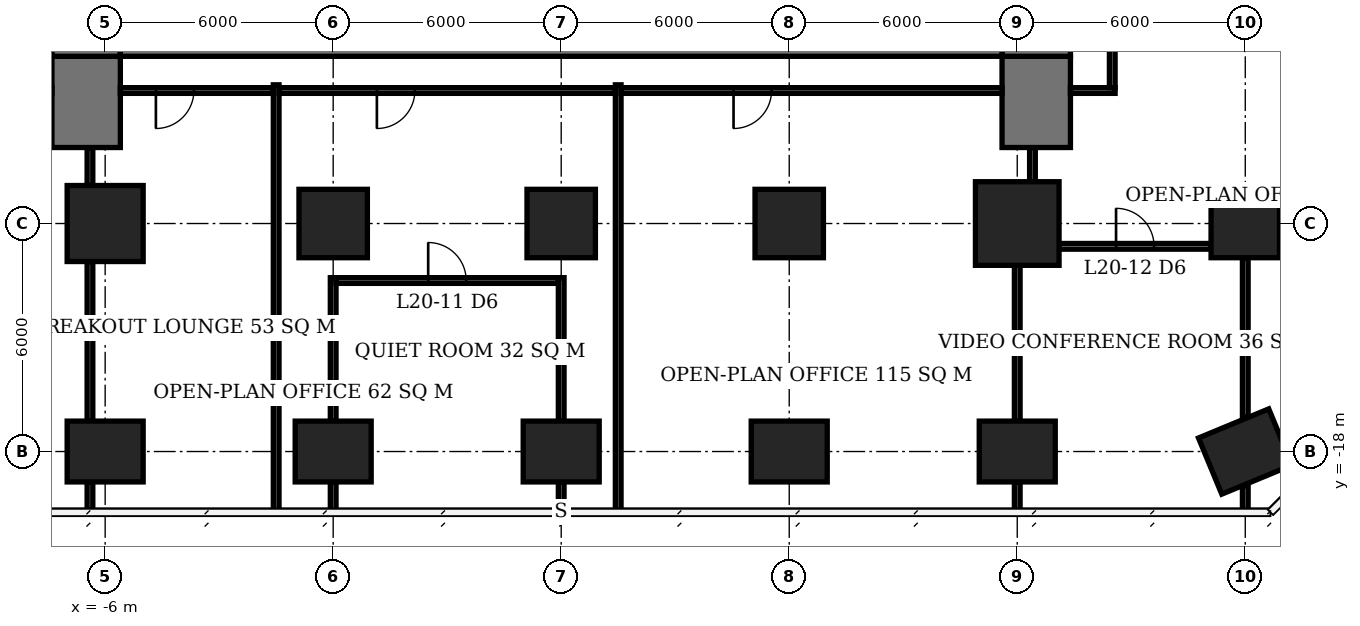
"""IFC4 building model, lengths in metres.
Left out: names, types, materials, properties, quantities, classifications, styles, units other than length and angle.
Written with IfcOpenShell. Run it as: python <this file> out.ifc"""

import sys

from ifc_helpers import new_model, si_unit, direction, frame, frame_2d, origin, origin_2d, place, context, subcontext, project, spatial, rectangle, extrude, element, fill, save


model = new_model("IFC4")
c1 = context("Model", 3, precision=1e-05, world=origin(), true_north=direction((0.0, 1.0)))
c2 = subcontext(c1, "Body", "Model", "MODEL_VIEW")
j1 = project(units=[si_unit("LENGTHUNIT", "METRE"), si_unit("PLANEANGLEUNIT", "RADIAN")], contexts=[c1])
p1 = place(None, origin())
s1 = spatial("IfcSite", under=j1, at=p1, CompositionType="ELEMENT")
p2 = place(p1, origin())
s2 = spatial("IfcBuilding", under=s1, at=p2, CompositionType="ELEMENT")
p3 = place(p2, frame((0.0, 0.0, 84.5)))
s3 = spatial("IfcBuildingStorey", under=s2, at=p3, CompositionType="ELEMENT", Elevation=84.5)
p4 = place(p3, frame((-6.0, -18.0, 0.0), z_axis=(0.0, 0.0, 1.0), x_axis=(1.0, 0.0, 0.0)))
e1 = element("IfcColumn", 1, at=p4, inside=s3, PredefinedType="COLUMN", context=c2, shape_type="SweptSolid", body=[
    extrude(rectangle(XDim=2.0, YDim=1.6, at=origin_2d()), origin(), (0.0, 0.0, 1.0), 3.9),
])
p5 = place(p3, frame((-6.0, -12.0, 0.0), z_axis=(0.0, 0.0, 1.0), x_axis=(1.0, 0.0, 0.0)))
e2 = element("IfcColumn", 2, at=p5, inside=s3, PredefinedType="COLUMN", context=c2, shape_type="SweptSolid", body=[
    extrude(rectangle(XDim=2.0, YDim=2.0, at=origin_2d()), origin(), (0.0, 0.0, 1.0), 3.9),
])
p6 = place(p3, frame((0.0, -18.0, 0.0), z_axis=(0.0, 0.0, 1.0), x_axis=(1.0, 0.0, 0.0)))
e3 = element("IfcColumn", 3, at=p6, inside=s3, PredefinedType="COLUMN", context=c2, shape_type="SweptSolid", body=[
    extrude(rectangle(XDim=2.0, YDim=1.6, at=origin_2d()), origin(), (0.0, 0.0, 1.0), 3.9),
])
p7 = place(p3, frame((0.0, -12.0, 0.0), z_axis=(0.0, 0.0, 1.0), x_axis=(1.0, 0.0, 0.0)))
e4 = element("IfcColumn", 4, at=p7, inside=s3, PredefinedType="COLUMN", context=c2, shape_type="SweptSolid", body=[
    extrude(rectangle(XDim=1.8, YDim=1.8, at=origin_2d()), origin(), (0.0, 0.0, 1.0), 3.9),
])
p8 = place(p3, frame((6.0, -18.0, 0.0), z_axis=(0.0, 0.0, 1.0), x_axis=(1.0, 0.0, 0.0)))
e5 = element("IfcColumn", 5, at=p8, inside=s3, PredefinedType="COLUMN", context=c2, shape_type="SweptSolid", body=[
    extrude(rectangle(XDim=2.0, YDim=1.6, at=origin_2d()), origin(), (0.0, 0.0, 1.0), 3.9),
])
p9 = place(p3, frame((6.0, -12.0, 0.0), z_axis=(0.0, 0.0, 1.0), x_axis=(1.0, 0.0, 0.0)))
e6 = element("IfcColumn", 6, at=p9, inside=s3, PredefinedType="COLUMN", context=c2, shape_type="SweptSolid", body=[
    extrude(rectangle(XDim=1.8, YDim=1.8, at=origin_2d()), origin(), (0.0, 0.0, 1.0), 3.9),
])
p10 = place(p3, frame((12.0, -18.0, 0.0), z_axis=(0.0, 0.0, 1.0), x_axis=(1.0, 0.0, 0.0)))
e7 = element("IfcColumn", 7, at=p10, inside=s3, PredefinedType="COLUMN", context=c2, shape_type="SweptSolid", body=[
    extrude(rectangle(XDim=2.0, YDim=1.6, at=origin_2d()), origin(), (0.0, 0.0, 1.0), 3.9),
])
p11 = place(p3, frame((12.0, -12.0, 0.0), z_axis=(0.0, 0.0, 1.0), x_axis=(1.0, 0.0, 0.0)))
e8 = element("IfcColumn", 8, at=p11, inside=s3, PredefinedType="COLUMN", context=c2, shape_type="SweptSolid", body=[
    extrude(rectangle(XDim=1.8, YDim=1.8, at=origin_2d()), origin(), (0.0, 0.0, 1.0), 3.9),
])
p12 = place(p3, frame((18.0, -18.0, 0.0), z_axis=(0.0, 0.0, 1.0), x_axis=(1.0, 0.0, 0.0)))
e9 = element("IfcColumn", 9, at=p12, inside=s3, PredefinedType="COLUMN", context=c2, shape_type="SweptSolid", body=[
    extrude(rectangle(XDim=2.0, YDim=1.6, at=origin_2d()), origin(), (0.0, 0.0, 1.0), 3.9),
])
p13 = place(p3, frame((18.0, -12.0, 0.0), z_axis=(0.0, 0.0, 1.0), x_axis=(1.0, 0.0, 0.0)))
e10 = element("IfcColumn", 10, at=p13, inside=s3, PredefinedType="COLUMN", context=c2, shape_type="SweptSolid", body=[
    extrude(rectangle(XDim=2.2, YDim=2.2, at=origin_2d()), origin(), (0.0, 0.0, 1.0), 3.9),
])
p14 = place(p3, frame((24.0, -18.0, 0.0), z_axis=(0.0, 0.0, 1.0), x_axis=(-0.923879532511, -0.382683432365, 0.0)))
e11 = element("IfcColumn", 11, at=p14, inside=s3, PredefinedType="COLUMN", context=c2, shape_type="SweptSolid", body=[
    extrude(rectangle(XDim=2.0, YDim=1.6, at=origin_2d()), origin(), (0.0, 0.0, 1.0), 3.9),
])
p15 = place(p3, frame((24.0, -12.0, 0.0), z_axis=(0.0, 0.0, 1.0), x_axis=(1.0, 0.0, 0.0)))
e12 = element("IfcColumn", 12, at=p15, inside=s3, PredefinedType="COLUMN", context=c2, shape_type="SweptSolid", body=[
    extrude(rectangle(XDim=1.8, YDim=1.8, at=origin_2d()), origin(), (0.0, 0.0, 1.0), 3.9),
])
p16 = place(p3, frame((-5.6, -6.6, 0.0), z_axis=(0.0, 0.0, 1.0), x_axis=(1.0, 0.0, 0.0)))
e13 = element("IfcWall", 13, at=p16, inside=s3, PredefinedType="SHEAR", context=c2, shape_type="SweptSolid", body=[
    extrude(rectangle(XDim=23.2, YDim=2.0, at=frame_2d((11.6, 0.0))), origin(), (0.0, 0.0, 1.0), 3.9),
])
p17 = place(p3, frame((-6.5, -7.6, 0.0), z_axis=(0.0, 0.0, 1.0), x_axis=(0.0, 1.0, 0.0)))
e14 = element("IfcWall", 14, at=p17, inside=s3, PredefinedType="SHEAR", context=c2, shape_type="SweptSolid", body=[
    extrude(rectangle(XDim=21.2, YDim=1.8, at=frame_2d((10.6, 0.0))), origin(), (0.0, 0.0, 1.0), 3.9),
])
p18 = place(p17, frame((7.8, 0.0, 0.0)))
e15 = element("IfcOpeningElement", 15, at=p18, cuts=e14, PredefinedType="OPENING", context=c2, shape_type="SweptSolid", body=[
    extrude(rectangle(XDim=1.8, YDim=2.4, at=frame_2d((0.9, 1.2))), frame((0.0, 0.91, 0.0), z_axis=(0.0, -1.0, 0.0), x_axis=(1.0, 0.0, 0.0)), (0.0, 0.0, 1.0), 1.82),
])
p19 = place(p3, frame((18.5, -7.6, 0.0), z_axis=(0.0, 0.0, 1.0), x_axis=(0.0, 1.0, 0.0)))
e16 = element("IfcWall", 16, at=p19, inside=s3, PredefinedType="SHEAR", context=c2, shape_type="SweptSolid", body=[
    extrude(rectangle(XDim=21.2, YDim=1.8, at=frame_2d((10.6, 0.0))), origin(), (0.0, 0.0, 1.0), 3.9),
])
p20 = place(p19, frame((9.2, 0.0, 0.0)))
e17 = element("IfcOpeningElement", 17, at=p20, cuts=e16, PredefinedType="OPENING", context=c2, shape_type="SweptSolid", body=[
    extrude(rectangle(XDim=1.8, YDim=2.4, at=frame_2d((0.9, 1.2))), frame((0.0, 0.91, 0.0), z_axis=(0.0, -1.0, 0.0), x_axis=(1.0, 0.0, 0.0)), (0.0, 0.0, 1.0), 1.82),
])
for number, where, z_axis, x_axis in (
    (18, (-6.5, -10.0, 0.0), (0.0, 0.0, 1.0), (0.0, 1.0, 0.0)),
    (19, (18.5, -10.0, 0.0), (0.0, 0.0, 1.0), (0.0, 1.0, 0.0)),
):
    element("IfcWall", number, at=place(p3, frame(where, z_axis=z_axis, x_axis=x_axis)), inside=s3, PredefinedType="SHEAR", context=c2, shape_type="SweptSolid", body=[
        extrude(rectangle(XDim=2.4, YDim=1.8, at=frame_2d((1.2, 0.0))), origin(), (0.0, 0.0, 1.0), 3.9),
    ])
p21 = place(p3, frame((0.075, -13.5, 0.0), z_axis=(0.0, 0.0, 1.0), x_axis=(1.0, 0.0, 0.0)))
e20 = element("IfcWall", 20, at=p21, inside=s3, PredefinedType="PARTITIONING", context=c2, shape_type="SweptSolid", body=[
    extrude(rectangle(XDim=5.85, YDim=0.15, at=frame_2d((2.925, 0.0))), origin(), (0.0, 0.0, 1.0), 3.65),
])
p22 = place(p21, frame((2.425, 0.0, 0.0)))
e21 = element("IfcOpeningElement", 21, at=p22, cuts=e20, PredefinedType="OPENING", context=c2, shape_type="SweptSolid", body=[
    extrude(rectangle(XDim=1.0, YDim=2.1, at=frame_2d((0.5, 1.05))), frame((0.0, 0.085, 0.0), z_axis=(0.0, -1.0, 0.0), x_axis=(1.0, 0.0, 0.0)), (0.0, 0.0, 1.0), 0.17),
])
p23 = place(p3, frame((19.1, -12.6, 0.0), z_axis=(0.0, 0.0, 1.0), x_axis=(1.0, 0.0, 0.0)))
e22 = element("IfcWall", 22, at=p23, inside=s3, PredefinedType="PARTITIONING", context=c2, shape_type="SweptSolid", body=[
    extrude(rectangle(XDim=4.0, YDim=0.15, at=frame_2d((2.0, 0.0))), origin(), (0.0, 0.0, 1.0), 3.65),
])
p24 = place(p23, frame((1.5, 0.0, 0.0)))
e23 = element("IfcOpeningElement", 23, at=p24, cuts=e22, PredefinedType="OPENING", context=c2, shape_type="SweptSolid", body=[
    extrude(rectangle(XDim=1.0, YDim=2.1, at=frame_2d((0.5, 1.05))), frame((0.0, 0.085, 0.0), z_axis=(0.0, -1.0, 0.0), x_axis=(1.0, 0.0, 0.0)), (0.0, 0.0, 1.0), 0.17),
])
p25 = place(p3, frame((0.0, -19.6, 0.0), z_axis=(0.0, 0.0, 1.0), x_axis=(0.0, 1.0, 0.0)))
e24 = element("IfcWall", 24, at=p25, inside=s3, PredefinedType="PARTITIONING", context=c2, shape_type="SweptSolid", body=[
    extrude(rectangle(XDim=0.8, YDim=0.15, at=frame_2d((0.4, 0.0))), origin(), (0.0, 0.0, 1.0), 3.65),
])
p26 = place(p3, frame((0.0, -17.2, 0.0), z_axis=(0.0, 0.0, 1.0), x_axis=(0.0, 1.0, 0.0)))
e25 = element("IfcWall", 25, at=p26, inside=s3, PredefinedType="PARTITIONING", context=c2, shape_type="SweptSolid", body=[
    extrude(rectangle(XDim=3.775, YDim=0.15, at=frame_2d((1.887, 0.0))), origin(), (0.0, 0.0, 1.0), 3.65),
])
p27 = place(p3, frame((6.0, -19.55, 0.0), z_axis=(0.0, 0.0, 1.0), x_axis=(0.0, 1.0, 0.0)))
e26 = element("IfcWall", 26, at=p27, inside=s3, PredefinedType="PARTITIONING", context=c2, shape_type="SweptSolid", body=[
    extrude(rectangle(XDim=0.75, YDim=0.15, at=frame_2d((0.375, 0.0))), origin(), (0.0, 0.0, 1.0), 3.65),
])
p28 = place(p3, frame((6.0, -17.2, 0.0), z_axis=(0.0, 0.0, 1.0), x_axis=(0.0, 1.0, 0.0)))
e27 = element("IfcWall", 27, at=p28, inside=s3, PredefinedType="PARTITIONING", context=c2, shape_type="SweptSolid", body=[
    extrude(rectangle(XDim=3.775, YDim=0.15, at=frame_2d((1.887, 0.0))), origin(), (0.0, 0.0, 1.0), 3.65),
])
p29 = place(p3, frame((18.0, -19.6, 0.0), z_axis=(0.0, 0.0, 1.0), x_axis=(0.0, 1.0, 0.0)))
e28 = element("IfcWall", 28, at=p29, inside=s3, PredefinedType="PARTITIONING", context=c2, shape_type="SweptSolid", body=[
    extrude(rectangle(XDim=0.8, YDim=0.15, at=frame_2d((0.4, 0.0))), origin(), (0.0, 0.0, 1.0), 3.65),
])
p30 = place(p3, frame((18.0, -17.2, 0.0), z_axis=(0.0, 0.0, 1.0), x_axis=(0.0, 1.0, 0.0)))
e29 = element("IfcWall", 29, at=p30, inside=s3, PredefinedType="PARTITIONING", context=c2, shape_type="SweptSolid", body=[
    extrude(rectangle(XDim=4.1, YDim=0.15, at=frame_2d((2.05, 0.0))), origin(), (0.0, 0.0, 1.0), 3.65),
])
p31 = place(p3, frame((24.0, -19.6, 0.0), z_axis=(0.0, 0.0, 1.0), x_axis=(0.0, 1.0, 0.0)))
e30 = element("IfcWall", 30, at=p31, inside=s3, PredefinedType="PARTITIONING", context=c2, shape_type="SweptSolid", body=[
    extrude(rectangle(XDim=0.703, YDim=0.15, at=frame_2d((0.352, 0.0))), origin(), (0.0, 0.0, 1.0), 3.65),
])
p32 = place(p3, frame((24.0, -17.103, 0.0), z_axis=(0.0, 0.0, 1.0), x_axis=(0.0, 1.0, 0.0)))
e31 = element("IfcWall", 31, at=p32, inside=s3, PredefinedType="PARTITIONING", context=c2, shape_type="SweptSolid", body=[
    extrude(rectangle(XDim=4.203, YDim=0.15, at=frame_2d((2.102, 0.0))), origin(), (0.0, 0.0, 1.0), 3.65),
])
p33 = place(p3, frame((-6.4, -19.55, 0.0), z_axis=(0.0, 0.0, 1.0), x_axis=(0.0, 1.0, 0.0)))
e32 = element("IfcWall", 32, at=p33, inside=s3, PredefinedType="PARTITIONING", context=c2, shape_type="SweptSolid", body=[
    extrude(rectangle(XDim=0.75, YDim=0.15, at=frame_2d((0.375, 0.0))), origin(), (0.0, 0.0, 1.0), 3.65),
])
p34 = place(p3, frame((-6.4, -17.2, 0.0), z_axis=(0.0, 0.0, 1.0), x_axis=(0.0, 1.0, 0.0)))
e33 = element("IfcWall", 33, at=p34, inside=s3, PredefinedType="PARTITIONING", context=c2, shape_type="SweptSolid", body=[
    extrude(rectangle(XDim=4.2, YDim=0.15, at=frame_2d((2.1, 0.0))), origin(), (0.0, 0.0, 1.0), 3.65),
])
p35 = place(p3, frame((-6.4, -11.0, 0.0), z_axis=(0.0, 0.0, 1.0), x_axis=(0.0, 1.0, 0.0)))
e34 = element("IfcWall", 34, at=p35, inside=s3, PredefinedType="PARTITIONING", context=c2, shape_type="SweptSolid", body=[
    extrude(rectangle(XDim=1.0, YDim=0.15, at=frame_2d((0.5, 0.0))), origin(), (0.0, 0.0, 1.0), 3.65),
])
p36 = place(p3, frame((-1.575, -8.5, 0.0), z_axis=(0.0, 0.0, 1.0), x_axis=(-1.0, 0.0, 0.0)))
e35 = element("IfcWall", 35, at=p36, inside=s3, PredefinedType="PARTITIONING", context=c2, shape_type="SweptSolid", body=[
    extrude(rectangle(XDim=4.025, YDim=0.15, at=frame_2d((2.013, 0.0))), origin(), (0.0, 0.0, 1.0), 3.65),
])
p37 = place(p36, frame((2.09, 0.0, 0.0)))
e36 = element("IfcOpeningElement", 36, at=p37, cuts=e35, PredefinedType="OPENING", context=c2, shape_type="SweptSolid", body=[
    extrude(rectangle(XDim=1.0, YDim=2.1, at=frame_2d((0.5, 1.05))), frame((0.0, 0.085, 0.0), z_axis=(0.0, -1.0, 0.0), x_axis=(1.0, 0.0, 0.0)), (0.0, 0.0, 1.0), 0.17),
])
p38 = place(p3, frame((-1.5, -19.6, 0.0), z_axis=(0.0, 0.0, 1.0), x_axis=(0.0, 1.0, 0.0)))
e37 = element("IfcWall", 37, at=p38, inside=s3, PredefinedType="PARTITIONING", context=c2, shape_type="SweptSolid", body=[
    extrude(rectangle(XDim=11.25, YDim=0.15, at=frame_2d((5.625, 0.0))), origin(), (0.0, 0.0, 1.0), 3.65),
])
p39 = place(p3, frame((7.425, -8.5, 0.0), z_axis=(0.0, 0.0, 1.0), x_axis=(-1.0, 0.0, 0.0)))
e38 = element("IfcWall", 38, at=p39, inside=s3, PredefinedType="PARTITIONING", context=c2, shape_type="SweptSolid", body=[
    extrude(rectangle(XDim=8.85, YDim=0.15, at=frame_2d((4.425, 0.0))), origin(), (0.0, 0.0, 1.0), 3.65),
])
p40 = place(p39, frame((5.275, 0.0, 0.0)))
e39 = element("IfcOpeningElement", 39, at=p40, cuts=e38, PredefinedType="OPENING", context=c2, shape_type="SweptSolid", body=[
    extrude(rectangle(XDim=1.0, YDim=2.1, at=frame_2d((0.5, 1.05))), frame((0.0, 0.085, 0.0), z_axis=(0.0, -1.0, 0.0), x_axis=(1.0, 0.0, 0.0)), (0.0, 0.0, 1.0), 0.17),
])
p41 = place(p3, frame((7.5, -19.6, 0.0), z_axis=(0.0, 0.0, 1.0), x_axis=(0.0, 1.0, 0.0)))
e40 = element("IfcWall", 40, at=p41, inside=s3, PredefinedType="PARTITIONING", context=c2, shape_type="SweptSolid", body=[
    extrude(rectangle(XDim=11.25, YDim=0.15, at=frame_2d((5.625, 0.0))), origin(), (0.0, 0.0, 1.0), 3.65),
])
p42 = place(p3, frame((17.6, -8.5, 0.0), z_axis=(0.0, 0.0, 1.0), x_axis=(-1.0, 0.0, 0.0)))
e41 = element("IfcWall", 41, at=p42, inside=s3, PredefinedType="PARTITIONING", context=c2, shape_type="SweptSolid", body=[
    extrude(rectangle(XDim=10.025, YDim=0.15, at=frame_2d((5.013, 0.0))), origin(), (0.0, 0.0, 1.0), 3.65),
])
p43 = place(p42, frame((6.065, 0.0, 0.0)))
e42 = element("IfcOpeningElement", 42, at=p43, cuts=e41, PredefinedType="OPENING", context=c2, shape_type="SweptSolid", body=[
    extrude(rectangle(XDim=1.0, YDim=2.1, at=frame_2d((0.5, 1.05))), frame((0.0, 0.085, 0.0), z_axis=(0.0, -1.0, 0.0), x_axis=(1.0, 0.0, 0.0)), (0.0, 0.0, 1.0), 0.17),
])
p44 = place(p3, frame((18.4, -10.9, 0.0), z_axis=(0.0, 0.0, 1.0), x_axis=(0.0, 1.0, 0.0)))
e43 = element("IfcWall", 43, at=p44, inside=s3, PredefinedType="PARTITIONING", context=c2, shape_type="SweptSolid", body=[
    extrude(rectangle(XDim=0.9, YDim=0.15, at=frame_2d((0.45, 0.0))), origin(), (0.0, 0.0, 1.0), 3.65),
])
p45 = place(p3, frame((19.4, -8.5, 0.0), z_axis=(0.0, 0.0, 1.0), x_axis=(1.0, 0.0, 0.0)))
e44 = element("IfcWall", 44, at=p45, inside=s3, PredefinedType="PARTITIONING", context=c2, shape_type="SweptSolid", body=[
    extrude(rectangle(XDim=1.175, YDim=0.15, at=frame_2d((0.587, 0.0))), origin(), (0.0, 0.0, 1.0), 3.65),
])
p46 = place(p3, frame((20.5, -8.425, 0.0), z_axis=(0.0, 0.0, 1.0), x_axis=(0.0, 1.0, 0.0)))
e45 = element("IfcWall", 45, at=p46, inside=s3, PredefinedType="PARTITIONING", context=c2, shape_type="SweptSolid", body=[
    extrude(rectangle(XDim=3.85, YDim=0.15, at=frame_2d((1.925, 0.0))), origin(), (0.0, 0.0, 1.0), 3.65),
])
p47 = place(p46, frame((2.025, 0.0, 0.0)))
e46 = element("IfcOpeningElement", 46, at=p47, cuts=e45, PredefinedType="OPENING", context=c2, shape_type="SweptSolid", body=[
    extrude(rectangle(XDim=1.0, YDim=2.1, at=frame_2d((0.5, 1.05))), frame((0.0, 0.085, 0.0), z_axis=(0.0, -1.0, 0.0), x_axis=(1.0, 0.0, 0.0)), (0.0, 0.0, 1.0), 0.17),
])
p48 = place(p22, origin())
e47 = element("IfcDoor", 47, at=p48, inside=s3, OperationType="SINGLE_SWING_LEFT", PredefinedType="DOOR", context=c2, shape_type="SweptSolid", body=[
    extrude(rectangle(XDim=1.0, YDim=2.1, at=frame_2d((0.5, 1.05))), frame((0.0, 0.025, 0.0), z_axis=(0.0, -1.0, 0.0), x_axis=(1.0, 0.0, 0.0)), (0.0, 0.0, 1.0), 0.05),
])
fill(e21, e47)
p49 = place(p24, origin())
e48 = element("IfcDoor", 48, at=p49, inside=s3, OperationType="SINGLE_SWING_LEFT", PredefinedType="DOOR", context=c2, shape_type="SweptSolid", body=[
    extrude(rectangle(XDim=1.0, YDim=2.1, at=frame_2d((0.5, 1.05))), frame((0.0, 0.025, 0.0), z_axis=(0.0, -1.0, 0.0), x_axis=(1.0, 0.0, 0.0)), (0.0, 0.0, 1.0), 0.05),
])
fill(e23, e48)
p50 = place(p37, origin())
e49 = element("IfcDoor", 49, at=p50, inside=s3, OperationType="SINGLE_SWING_RIGHT", PredefinedType="DOOR", context=c2, shape_type="SweptSolid", body=[
    extrude(rectangle(XDim=1.0, YDim=2.1, at=frame_2d((0.5, 1.05))), frame((0.0, 0.025, 0.0), z_axis=(0.0, -1.0, 0.0), x_axis=(1.0, 0.0, 0.0)), (0.0, 0.0, 1.0), 0.05),
])
fill(e36, e49)
p51 = place(p43, origin())
e50 = element("IfcDoor", 50, at=p51, inside=s3, OperationType="SINGLE_SWING_RIGHT", PredefinedType="DOOR", context=c2, shape_type="SweptSolid", body=[
    extrude(rectangle(XDim=1.0, YDim=2.1, at=frame_2d((0.5, 1.05))), frame((0.0, 0.025, 0.0), z_axis=(0.0, -1.0, 0.0), x_axis=(1.0, 0.0, 0.0)), (0.0, 0.0, 1.0), 0.05),
])
fill(e42, e50)
p52 = place(p40, origin())
e51 = element("IfcDoor", 51, at=p52, inside=s3, OperationType="SINGLE_SWING_RIGHT", PredefinedType="DOOR", context=c2, shape_type="SweptSolid", body=[
    extrude(rectangle(XDim=1.0, YDim=2.1, at=frame_2d((0.5, 1.05))), frame((0.0, 0.025, 0.0), z_axis=(0.0, -1.0, 0.0), x_axis=(1.0, 0.0, 0.0)), (0.0, 0.0, 1.0), 0.05),
])
fill(e39, e51)
save(model, sys.argv[1])
